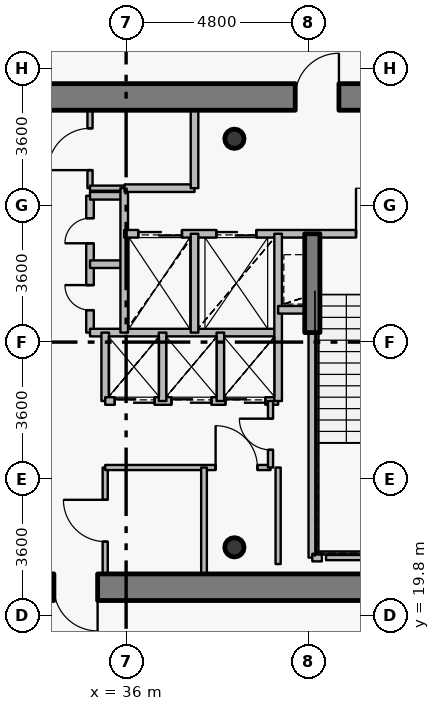
"""IFC4 building model, lengths in metres.
Left out: names, types, materials, properties, quantities, classifications, styles, units other than length and angle.
Written with IfcOpenShell. Run it as: python <this file> out.ifc"""

import sys

from ifc_helpers import new_model, si_unit, direction, frame, frame_2d, origin, origin_2d, place, context, subcontext, project, spatial, rectangle, hollow_circle, extrude, source, transform, mapped, element, fill, save


model = new_model("IFC4")
c1 = context("Model", 3, precision=1e-05, world=origin(), true_north=direction((0.0, 1.0)))
c2 = subcontext(c1, "Body", "Model", "MODEL_VIEW")
j1 = project(units=[si_unit("LENGTHUNIT", "METRE"), si_unit("PLANEANGLEUNIT", "RADIAN")], contexts=[c1])
p1 = place(None, origin())
s1 = spatial("IfcSite", under=j1, at=p1, CompositionType="ELEMENT")
p2 = place(p1, origin())
s2 = spatial("IfcBuilding", under=s1, at=p2, CompositionType="ELEMENT")
p3 = place(p2, frame((0.0, 0.0, 346.8)))
s3 = spatial("IfcBuildingStorey", under=s2, at=p3, CompositionType="ELEMENT", Elevation=346.8)
for number, where, z_axis, x_axis in (
    (1, (38.85, 21.6, 0.0), (0.0, 0.0, 1.0), (1.0, 0.0, 0.0)),
    (2, (38.85, 32.35, 0.0), (0.0, 0.0, 1.0), (1.0, 0.0, 0.0)),
):
    element("IfcColumn", number, at=place(p3, frame(where, z_axis=z_axis, x_axis=x_axis)), inside=s3, PredefinedType="COLUMN", context=c2, shape_type="SweptSolid", body=[
        extrude(hollow_circle(Radius=0.254, WallThickness=0.02, at=origin_2d()), origin(), (0.0, 0.0, 1.0), 4.2),
    ])
p4 = place(p3, frame((27.6, 33.45, 0.0), z_axis=(0.0, 0.0, 1.0), x_axis=(1.0, 0.0, 0.0)))
e3 = element("IfcWall", 3, at=p4, inside=s3, PredefinedType="SHEAR", context=c2, shape_type="SweptSolid", body=[
    extrude(rectangle(XDim=16.8, YDim=0.7, at=frame_2d((8.4, 0.0))), origin(), (0.0, 0.0, 1.0), 3.45),
])
p5 = place(p4, frame((12.85, 0.0, 0.0)))
e4 = element("IfcOpeningElement", 4, at=p5, cuts=e3, PredefinedType="OPENING", context=c2, shape_type="SweptSolid", body=[
    extrude(rectangle(XDim=1.15, YDim=2.15, at=origin_2d()), frame((0.575, 0.36, 1.075), z_axis=(0.0, -1.0, 0.0), x_axis=(1.0, 0.0, 0.0)), (0.0, 0.0, 1.0), 0.72),
])
p6 = place(p3, frame((44.4, 20.55, 0.0), z_axis=(0.0, 0.0, 1.0), x_axis=(-1.0, 0.0, 0.0)))
e5 = element("IfcWall", 5, at=p6, inside=s3, PredefinedType="SHEAR", context=c2, shape_type="SweptSolid", body=[
    extrude(rectangle(XDim=16.8, YDim=0.7, at=frame_2d((8.4, 0.0))), origin(), (0.0, 0.0, 1.0), 3.45),
])
p7 = place(p6, frame((13.0, 0.0, 0.0)))
e6 = element("IfcOpeningElement", 6, at=p7, cuts=e5, PredefinedType="OPENING", context=c2, shape_type="SweptSolid", body=[
    extrude(rectangle(XDim=1.15, YDim=2.15, at=origin_2d()), frame((0.575, 0.36, 1.075), z_axis=(0.0, -1.0, 0.0), x_axis=(1.0, 0.0, 0.0)), (0.0, 0.0, 1.0), 0.72),
])
p8 = place(p6, frame((9.15, 0.0, 0.0)))
e7 = element("IfcOpeningElement", 7, at=p8, cuts=e5, PredefinedType="OPENING", context=c2, shape_type="SweptSolid", body=[
    extrude(rectangle(XDim=1.15, YDim=2.15, at=origin_2d()), frame((0.575, 0.36, 1.075), z_axis=(0.0, -1.0, 0.0), x_axis=(1.0, 0.0, 0.0)), (0.0, 0.0, 1.0), 0.72),
])
p9 = place(p3, frame((40.9, 27.25, 0.0), z_axis=(0.0, 0.0, 1.0), x_axis=(0.0, 1.0, 0.0)))
e8 = element("IfcWall", 8, at=p9, inside=s3, PredefinedType="SHEAR", context=c2, shape_type="SweptSolid", body=[
    extrude(rectangle(XDim=2.6, YDim=0.4, at=frame_2d((1.3, 0.0))), origin(), (0.0, 0.0, 1.0), 3.5),
])
p10 = place(p3, frame((35.05, 27.25, 0.0), z_axis=(0.0, 0.0, 1.0), x_axis=(0.0, 1.0, 0.0)))
e9 = element("IfcWall", 9, at=p10, inside=s3, PredefinedType="PARTITIONING", context=c2, shape_type="SweptSolid", body=[
    extrude(rectangle(XDim=3.6, YDim=0.2, at=frame_2d((1.8, 0.0))), origin(), (0.0, 0.0, 1.0), 3.9),
])
p11 = place(p10, frame((0.59, 0.0, 0.0)))
e10 = element("IfcOpeningElement", 10, at=p11, cuts=e9, PredefinedType="OPENING", context=c2, shape_type="SweptSolid", body=[
    extrude(rectangle(XDim=0.66, YDim=2.05, at=origin_2d()), frame((0.33, 0.11, 1.025), z_axis=(0.0, -1.0, 0.0), x_axis=(1.0, 0.0, 0.0)), (0.0, 0.0, 1.0), 0.22),
])
p12 = place(p10, frame((2.35, 0.0, 0.0)))
e11 = element("IfcOpeningElement", 11, at=p12, cuts=e9, PredefinedType="OPENING", context=c2, shape_type="SweptSolid", body=[
    extrude(rectangle(XDim=0.66, YDim=2.05, at=origin_2d()), frame((0.33, 0.11, 1.025), z_axis=(0.0, -1.0, 0.0), x_axis=(1.0, 0.0, 0.0)), (0.0, 0.0, 1.0), 0.22),
])
p13 = place(p3, frame((35.05, 27.25, 0.0), z_axis=(0.0, 0.0, 1.0), x_axis=(1.0, 0.0, 0.0)))
e12 = element("IfcWall", 12, at=p13, inside=s3, PredefinedType="PARTITIONING", context=c2, shape_type="SweptSolid", body=[
    extrude(rectangle(XDim=4.95, YDim=0.2, at=frame_2d((2.475, 0.0))), origin(), (0.0, 0.0, 1.0), 3.485),
])
for number, where, z_axis, x_axis in (
    (13, (35.05, 29.05, 0.0), (0.0, 0.0, 1.0), (1.0, 0.0, 0.0)),
    (14, (35.05, 30.85, 0.0), (0.0, 0.0, 1.0), (1.0, 0.0, 0.0)),
):
    element("IfcWall", number, at=place(p3, frame(where, z_axis=z_axis, x_axis=x_axis)), inside=s3, PredefinedType="PARTITIONING", context=c2, shape_type="SweptSolid", body=[
        extrude(rectangle(XDim=0.9, YDim=0.2, at=frame_2d((0.45, 0.0))), origin(), (0.0, 0.0, 1.0), 3.9),
    ])
p14 = place(p3, frame((35.05, 31.05, 0.0), z_axis=(0.0, 0.0, 1.0), x_axis=(0.0, 1.0, 0.0)))
e15 = element("IfcWall", 15, at=p14, inside=s3, PredefinedType="PARTITIONING", context=c2, shape_type="SweptSolid", body=[
    extrude(rectangle(XDim=2.05, YDim=0.135, at=frame_2d((1.025, 0.0))), origin(), (0.0, 0.0, 1.0), 3.485),
])
p15 = place(p14, frame((0.475, 0.0, 0.0)))
e16 = element("IfcOpeningElement", 16, at=p15, cuts=e15, PredefinedType="OPENING", context=c2, shape_type="SweptSolid", body=[
    extrude(rectangle(XDim=1.1, YDim=2.15, at=origin_2d()), frame((0.55, 0.078, 1.075), z_axis=(0.0, -1.0, 0.0), x_axis=(1.0, 0.0, 0.0)), (0.0, 0.0, 1.0), 0.155),
])
p16 = place(p3, frame((35.05, 31.05, 0.0), z_axis=(0.0, 0.0, 1.0), x_axis=(1.0, 0.0, 0.0)))
e17 = element("IfcWall", 17, at=p16, inside=s3, PredefinedType="PARTITIONING", context=c2, shape_type="SweptSolid", body=[
    extrude(rectangle(XDim=0.9, YDim=0.135, at=frame_2d((0.45, 0.0))), origin(), (0.0, 0.0, 1.0), 3.9),
])
p17 = place(p3, frame((35.45, 20.9, 0.0), z_axis=(0.0, 0.0, 1.0), x_axis=(0.0, 1.0, 0.0)))
e18 = element("IfcWall", 18, at=p17, inside=s3, PredefinedType="PARTITIONING", context=c2, shape_type="SweptSolid", body=[
    extrude(rectangle(XDim=2.8, YDim=0.135, at=frame_2d((1.4, 0.0))), origin(), (0.0, 0.0, 1.0), 3.485),
])
p18 = place(p17, frame((0.85, 0.0, 0.0)))
e19 = element("IfcOpeningElement", 19, at=p18, cuts=e18, PredefinedType="OPENING", context=c2, shape_type="SweptSolid", body=[
    extrude(rectangle(XDim=1.1, YDim=2.15, at=origin_2d()), frame((0.55, 0.078, 1.075), z_axis=(0.0, -1.0, 0.0), x_axis=(1.0, 0.0, 0.0)), (0.0, 0.0, 1.0), 0.155),
])
p19 = place(p3, frame((35.45, 23.7, 0.0), z_axis=(0.0, 0.0, 1.0), x_axis=(1.0, 0.0, 0.0)))
e20 = element("IfcWall", 20, at=p19, inside=s3, PredefinedType="PARTITIONING", context=c2, shape_type="SweptSolid", body=[
    extrude(rectangle(XDim=4.35, YDim=0.135, at=frame_2d((2.175, 0.0))), origin(), (0.0, 0.0, 1.0), 3.485),
])
p20 = place(p19, frame((2.905, 0.0, 0.0)))
e21 = element("IfcOpeningElement", 21, at=p20, cuts=e20, PredefinedType="OPENING", context=c2, shape_type="SweptSolid", body=[
    extrude(rectangle(XDim=1.1, YDim=2.15, at=origin_2d()), frame((0.55, 0.078, 1.075), z_axis=(0.0, -1.0, 0.0), x_axis=(1.0, 0.0, 0.0)), (0.0, 0.0, 1.0), 0.155),
])
p21 = place(p3, frame((35.45, 25.45, 0.0), z_axis=(0.0, 0.0, 1.0), x_axis=(0.0, 1.0, 0.0)))
e22 = element("IfcWall", 22, at=p21, inside=s3, PredefinedType="PARTITIONING", context=c2, shape_type="SweptSolid", body=[
    extrude(rectangle(XDim=1.8, YDim=0.2, at=frame_2d((0.9, 0.0))), origin(), (0.0, 0.0, 1.0), 3.9),
])
p22 = place(p3, frame((35.45, 25.45, 0.0), z_axis=(0.0, 0.0, 1.0), x_axis=(1.0, 0.0, 0.0)))
e23 = element("IfcWall", 23, at=p22, inside=s3, PredefinedType="PARTITIONING", context=c2, shape_type="SweptSolid", body=[
    extrude(rectangle(XDim=4.55, YDim=0.2, at=frame_2d((2.275, 0.0))), origin(), (0.0, 0.0, 1.0), 3.485),
])
p23 = place(p22, frame((0.25, 0.0, 0.0)))
e24 = element("IfcOpeningElement", 24, at=p23, cuts=e23, PredefinedType="OPENING", context=c2, shape_type="SweptSolid", body=[
    extrude(rectangle(XDim=1.05, YDim=2.15, at=origin_2d()), frame((0.525, 0.11, 1.075), z_axis=(0.0, -1.0, 0.0), x_axis=(1.0, 0.0, 0.0)), (0.0, 0.0, 1.0), 0.22),
])
p24 = place(p22, frame((1.745, 0.0, 0.0)))
e25 = element("IfcOpeningElement", 25, at=p24, cuts=e23, PredefinedType="OPENING", context=c2, shape_type="SweptSolid", body=[
    extrude(rectangle(XDim=1.05, YDim=2.15, at=origin_2d()), frame((0.525, 0.11, 1.075), z_axis=(0.0, -1.0, 0.0), x_axis=(1.0, 0.0, 0.0)), (0.0, 0.0, 1.0), 0.22),
])
p25 = place(p22, frame((3.165, 0.0, 0.0)))
e26 = element("IfcOpeningElement", 26, at=p25, cuts=e23, PredefinedType="OPENING", context=c2, shape_type="SweptSolid", body=[
    extrude(rectangle(XDim=1.05, YDim=2.15, at=origin_2d()), frame((0.525, 0.11, 1.075), z_axis=(0.0, -1.0, 0.0), x_axis=(1.0, 0.0, 0.0)), (0.0, 0.0, 1.0), 0.22),
])
p26 = place(p3, frame((35.95, 27.25, 0.0), z_axis=(0.0, 0.0, 1.0), x_axis=(0.0, 1.0, 0.0)))
e27 = element("IfcWall", 27, at=p26, inside=s3, PredefinedType="PARTITIONING", context=c2, shape_type="SweptSolid", body=[
    extrude(rectangle(XDim=3.8, YDim=0.2, at=frame_2d((1.9, 0.0))), origin(), (0.0, 0.0, 1.0), 3.9),
])
p27 = place(p3, frame((35.95, 29.85, 0.0), z_axis=(0.0, 0.0, 1.0), x_axis=(1.0, 0.0, 0.0)))
e28 = element("IfcWall", 28, at=p27, inside=s3, PredefinedType="PARTITIONING", context=c2, shape_type="SweptSolid", body=[
    extrude(rectangle(XDim=8.49, YDim=0.2, at=frame_2d((4.245, 0.0))), origin(), (0.0, 0.0, 1.0), 3.485),
])
p28 = place(p27, frame((6.1, 0.0, 0.0)))
e29 = element("IfcOpeningElement", 29, at=p28, cuts=e28, PredefinedType="OPENING", context=c2, shape_type="SweptSolid", body=[
    extrude(rectangle(XDim=1.2, YDim=2.15, at=origin_2d()), frame((0.6, 0.11, 1.075), z_axis=(0.0, -1.0, 0.0), x_axis=(1.0, 0.0, 0.0)), (0.0, 0.0, 1.0), 0.22),
])
p29 = place(p27, frame((0.37, 0.0, 0.0)))
e30 = element("IfcOpeningElement", 30, at=p29, cuts=e28, PredefinedType="OPENING", context=c2, shape_type="SweptSolid", body=[
    extrude(rectangle(XDim=1.15, YDim=2.15, at=origin_2d()), frame((0.575, 0.11, 1.075), z_axis=(0.0, -1.0, 0.0), x_axis=(1.0, 0.0, 0.0)), (0.0, 0.0, 1.0), 0.22),
])
p30 = place(p27, frame((2.425, 0.0, 0.0)))
e31 = element("IfcOpeningElement", 31, at=p30, cuts=e28, PredefinedType="OPENING", context=c2, shape_type="SweptSolid", body=[
    extrude(rectangle(XDim=1.05, YDim=2.15, at=origin_2d()), frame((0.525, 0.11, 1.075), z_axis=(0.0, -1.0, 0.0), x_axis=(1.0, 0.0, 0.0)), (0.0, 0.0, 1.0), 0.22),
])
p31 = place(p3, frame((35.96, 31.05, 0.0), z_axis=(0.0, 0.0, 1.0), x_axis=(1.0, 0.0, 0.0)))
e32 = element("IfcWall", 32, at=p31, inside=s3, PredefinedType="PARTITIONING", context=c2, shape_type="SweptSolid", body=[
    extrude(rectangle(XDim=1.84, YDim=0.2, at=frame_2d((0.92, 0.0))), origin(), (0.0, 0.0, 1.0), 3.9),
])
p32 = place(p3, frame((36.96, 25.45, 0.0), z_axis=(0.0, 0.0, 1.0), x_axis=(0.0, 1.0, 0.0)))
e33 = element("IfcWall", 33, at=p32, inside=s3, PredefinedType="PARTITIONING", context=c2, shape_type="SweptSolid", body=[
    extrude(rectangle(XDim=1.8, YDim=0.2, at=frame_2d((0.9, 0.0))), origin(), (0.0, 0.0, 1.0), 3.9),
])
p33 = place(p3, frame((37.8, 27.25, 0.0), z_axis=(0.0, 0.0, 1.0), x_axis=(0.0, 1.0, 0.0)))
e34 = element("IfcWall", 34, at=p33, inside=s3, PredefinedType="PARTITIONING", context=c2, shape_type="SweptSolid", body=[
    extrude(rectangle(XDim=2.6, YDim=0.2, at=frame_2d((1.3, 0.0))), origin(), (0.0, 0.0, 1.0), 3.9),
])
p34 = place(p3, frame((37.8, 31.05, 0.0), z_axis=(0.0, 0.0, 1.0), x_axis=(0.0, 1.0, 0.0)))
e35 = element("IfcWall", 35, at=p34, inside=s3, PredefinedType="PARTITIONING", context=c2, shape_type="SweptSolid", body=[
    extrude(rectangle(XDim=2.05, YDim=0.2, at=frame_2d((1.025, 0.0))), origin(), (0.0, 0.0, 1.0), 3.485),
])
p35 = place(p3, frame((38.05, 20.38, 0.0), z_axis=(0.0, 0.0, 1.0), x_axis=(0.0, 1.0, 0.0)))
e36 = element("IfcWall", 36, at=p35, inside=s3, PredefinedType="PARTITIONING", context=c2, shape_type="SweptSolid", body=[
    extrude(rectangle(XDim=3.32, YDim=0.15, at=frame_2d((1.66, 0.0))), origin(), (0.0, 0.0, 1.0), 3.435),
])
p36 = place(p3, frame((38.48, 25.45, 0.0), z_axis=(0.0, 0.0, 1.0), x_axis=(0.0, 1.0, 0.0)))
e37 = element("IfcWall", 37, at=p36, inside=s3, PredefinedType="PARTITIONING", context=c2, shape_type="SweptSolid", body=[
    extrude(rectangle(XDim=1.8, YDim=0.2, at=frame_2d((0.9, 0.0))), origin(), (0.0, 0.0, 1.0), 3.9),
])
p37 = place(p3, frame((39.8, 23.7, 0.0), z_axis=(0.0, 0.0, 1.0), x_axis=(0.0, 1.0, 0.0)))
e38 = element("IfcWall", 38, at=p37, inside=s3, PredefinedType="PARTITIONING", context=c2, shape_type="SweptSolid", body=[
    extrude(rectangle(XDim=1.75, YDim=0.135, at=frame_2d((0.875, 0.0))), origin(), (0.0, 0.0, 1.0), 3.9),
])
p38 = place(p37, frame((0.465, 0.0, 0.0)))
e39 = element("IfcOpeningElement", 39, at=p38, cuts=e38, PredefinedType="OPENING", context=c2, shape_type="SweptSolid", body=[
    extrude(rectangle(XDim=0.82, YDim=2.1, at=origin_2d()), frame((0.41, 0.078, 1.05), z_axis=(0.0, -1.0, 0.0), x_axis=(1.0, 0.0, 0.0)), (0.0, 0.0, 1.0), 0.155),
])
p39 = place(p3, frame((40.0, 25.45, 0.0), z_axis=(0.0, 0.0, 1.0), x_axis=(0.0, 1.0, 0.0)))
e40 = element("IfcWall", 40, at=p39, inside=s3, PredefinedType="PARTITIONING", context=c2, shape_type="SweptSolid", body=[
    extrude(rectangle(XDim=4.4, YDim=0.2, at=frame_2d((2.2, 0.0))), origin(), (0.0, 0.0, 1.0), 3.9),
])
p40 = place(p3, frame((40.0, 27.85, 0.0), z_axis=(0.0, 0.0, 1.0), x_axis=(1.0, 0.0, 0.0)))
e41 = element("IfcWall", 41, at=p40, inside=s3, PredefinedType="PARTITIONING", context=c2, shape_type="SweptSolid", body=[
    extrude(rectangle(XDim=0.9, YDim=0.2, at=frame_2d((0.45, 0.0))), origin(), (0.0, 0.0, 1.0), 3.9),
])
p41 = place(p3, frame((40.9, 21.33, 0.0), z_axis=(0.0, 0.0, 1.0), x_axis=(0.0, 1.0, 0.0)))
e42 = element("IfcWall", 42, at=p41, inside=s3, PredefinedType="PARTITIONING", context=c2, shape_type="SweptSolid", body=[
    extrude(rectangle(XDim=5.91, YDim=0.2, at=frame_2d((2.955, 0.0))), origin(), (0.0, 0.0, 1.0), 3.435),
])
p42 = place(p3, frame((40.9, 21.33, 0.0), z_axis=(0.0, 0.0, 1.0), x_axis=(1.0, 0.0, 0.0)))
e43 = element("IfcWall", 43, at=p42, inside=s3, PredefinedType="PARTITIONING", context=c2, shape_type="SweptSolid", body=[
    extrude(rectangle(XDim=0.25, YDim=0.2, at=frame_2d((0.125, 0.0))), origin(), (0.0, 0.0, 1.0), 3.435),
])
p43 = place(p3, frame((44.24, 21.33, 0.0), z_axis=(0.0, 0.0, 1.0), x_axis=(-1.0, 0.0, 0.0)))
e44 = element("IfcWall", 44, at=p43, inside=s3, PredefinedType="PARTITIONING", context=c2, shape_type="SweptSolid", body=[
    extrude(rectangle(XDim=2.98, YDim=0.135, at=frame_2d((1.49, 0.0))), origin(), (0.0, 0.0, 1.0), 3.435),
])
p44 = place(p3, frame((40.0, 23.7, 0.0), z_axis=(0.0, 0.0, 1.0), x_axis=(0.0, -1.0, 0.0)))
e45 = element("IfcWall", 45, at=p44, inside=s3, PredefinedType="PARTITIONING", context=c2, shape_type="SweptSolid", body=[
    extrude(rectangle(XDim=2.54, YDim=0.135, at=frame_2d((1.27, 0.0))), origin(), (0.0, 0.0, 1.0), 3.435),
])
m1 = source(origin(), c2, "Body", "SweptSolid", [
    extrude(rectangle(XDim=1.15, YDim=2.15, at=origin_2d()), frame((0.575, 0.025, 1.075), z_axis=(0.0, -1.0, 0.0), x_axis=(1.0, 0.0, 0.0)), (0.0, 0.0, 1.0), 0.05),
])
p45 = place(p5, origin())
e46 = element("IfcDoor", 46, at=p45, inside=s3, OperationType="SINGLE_SWING_RIGHT", PredefinedType="DOOR", context=c2, shape_type="MappedRepresentation", body=[
    mapped(m1, transform((0.0, 0.0, 0.0), x_axis=(1.0, 0.0, 0.0), y_axis=(0.0, 1.0, 0.0), z_axis=(0.0, 0.0, 1.0), scale=1.0)),
])
fill(e4, e46)
p46 = place(p8, origin())
e47 = element("IfcDoor", 47, at=p46, inside=s3, OperationType="SINGLE_SWING_LEFT", PredefinedType="DOOR", context=c2, shape_type="MappedRepresentation", body=[
    mapped(m1, transform((0.0, 0.0, 0.0), x_axis=(1.0, 0.0, 0.0), y_axis=(0.0, 1.0, 0.0), z_axis=(0.0, 0.0, 1.0), scale=1.0)),
])
fill(e7, e47)
m2 = source(origin(), c2, "Body", "SweptSolid", [
    extrude(rectangle(XDim=1.2, YDim=2.15, at=origin_2d()), frame((0.6, 0.025, 1.075), z_axis=(0.0, -1.0, 0.0), x_axis=(1.0, 0.0, 0.0)), (0.0, 0.0, 1.0), 0.05),
])
p47 = place(p28, origin())
e48 = element("IfcDoor", 48, at=p47, inside=s3, OperationType="SINGLE_SWING_LEFT", PredefinedType="DOOR", context=c2, shape_type="MappedRepresentation", body=[
    mapped(m2, transform((0.0, 0.0, 0.0), x_axis=(1.0, 0.0, 0.0), y_axis=(0.0, 1.0, 0.0), z_axis=(0.0, 0.0, 1.0), scale=1.0)),
])
fill(e29, e48)
m3 = source(origin(), c2, "Body", "SweptSolid", [
    extrude(rectangle(XDim=1.15, YDim=2.15, at=origin_2d()), frame((0.575, 0.025, 1.075), z_axis=(0.0, -1.0, 0.0), x_axis=(1.0, 0.0, 0.0)), (0.0, 0.0, 1.0), 0.05),
])
p48 = place(p29, origin())
e49 = element("IfcDoor", 49, at=p48, inside=s3, OperationType="DOUBLE_DOOR_SLIDING", PredefinedType="USERDEFINED", context=c2, shape_type="MappedRepresentation", body=[
    mapped(m3, transform((0.0, 0.0, 0.0), x_axis=(1.0, 0.0, 0.0), y_axis=(0.0, 1.0, 0.0), z_axis=(0.0, 0.0, 1.0), scale=1.0)),
])
fill(e30, e49)
m4 = source(origin(), c2, "Body", "SweptSolid", [
    extrude(rectangle(XDim=1.05, YDim=2.15, at=origin_2d()), frame((0.525, 0.025, 1.075), z_axis=(0.0, -1.0, 0.0), x_axis=(1.0, 0.0, 0.0)), (0.0, 0.0, 1.0), 0.05),
])
p49 = place(p30, origin())
e50 = element("IfcDoor", 50, at=p49, inside=s3, OperationType="DOUBLE_DOOR_SLIDING", PredefinedType="USERDEFINED", context=c2, shape_type="MappedRepresentation", body=[
    mapped(m4, transform((0.0, 0.0, 0.0), x_axis=(1.0, 0.0, 0.0), y_axis=(0.0, 1.0, 0.0), z_axis=(0.0, 0.0, 1.0), scale=1.0)),
])
fill(e31, e50)
p50 = place(p23, origin())
e51 = element("IfcDoor", 51, at=p50, inside=s3, OperationType="DOUBLE_DOOR_SLIDING", PredefinedType="USERDEFINED", context=c2, shape_type="MappedRepresentation", body=[
    mapped(m4, transform((0.0, 0.0, 0.0), x_axis=(1.0, 0.0, 0.0), y_axis=(0.0, 1.0, 0.0), z_axis=(0.0, 0.0, 1.0), scale=1.0)),
])
fill(e24, e51)
p51 = place(p24, origin())
e52 = element("IfcDoor", 52, at=p51, inside=s3, OperationType="DOUBLE_DOOR_SLIDING", PredefinedType="USERDEFINED", context=c2, shape_type="MappedRepresentation", body=[
    mapped(m4, transform((0.0, 0.0, 0.0), x_axis=(1.0, 0.0, 0.0), y_axis=(0.0, 1.0, 0.0), z_axis=(0.0, 0.0, 1.0), scale=1.0)),
])
fill(e25, e52)
p52 = place(p25, origin())
e53 = element("IfcDoor", 53, at=p52, inside=s3, OperationType="DOUBLE_DOOR_SLIDING", PredefinedType="USERDEFINED", context=c2, shape_type="MappedRepresentation", body=[
    mapped(m4, transform((0.0, 0.0, 0.0), x_axis=(1.0, 0.0, 0.0), y_axis=(0.0, 1.0, 0.0), z_axis=(0.0, 0.0, 1.0), scale=1.0)),
])
fill(e26, e53)
m5 = source(origin(), c2, "Body", "SweptSolid", [
    extrude(rectangle(XDim=0.66, YDim=2.05, at=origin_2d()), frame((0.33, 0.025, 1.025), z_axis=(0.0, -1.0, 0.0), x_axis=(1.0, 0.0, 0.0)), (0.0, 0.0, 1.0), 0.05),
])
p53 = place(p11, origin())
e54 = element("IfcDoor", 54, at=p53, inside=s3, OperationType="SINGLE_SWING_RIGHT", PredefinedType="USERDEFINED", context=c2, shape_type="MappedRepresentation", body=[
    mapped(m5, transform((0.0, 0.0, 0.0), x_axis=(1.0, 0.0, 0.0), y_axis=(0.0, 1.0, 0.0), z_axis=(0.0, 0.0, 1.0), scale=1.0)),
])
fill(e10, e54)
p54 = place(p12, origin())
e55 = element("IfcDoor", 55, at=p54, inside=s3, OperationType="SINGLE_SWING_LEFT", PredefinedType="USERDEFINED", context=c2, shape_type="MappedRepresentation", body=[
    mapped(m5, transform((0.0, 0.0, 0.0), x_axis=(1.0, 0.0, 0.0), y_axis=(0.0, 1.0, 0.0), z_axis=(0.0, 0.0, 1.0), scale=1.0)),
])
fill(e11, e55)
m6 = source(origin(), c2, "Body", "SweptSolid", [
    extrude(rectangle(XDim=1.1, YDim=2.15, at=origin_2d()), frame((0.55, 0.025, 1.075), z_axis=(0.0, -1.0, 0.0), x_axis=(1.0, 0.0, 0.0)), (0.0, 0.0, 1.0), 0.05),
])
p55 = place(p18, origin())
e56 = element("IfcDoor", 56, at=p55, inside=s3, OperationType="SINGLE_SWING_RIGHT", PredefinedType="DOOR", context=c2, shape_type="MappedRepresentation", body=[
    mapped(m6, transform((0.0, 0.0, 0.0), x_axis=(1.0, 0.0, 0.0), y_axis=(0.0, 1.0, 0.0), z_axis=(0.0, 0.0, 1.0), scale=1.0)),
])
fill(e19, e56)
p56 = place(p20, origin())
e57 = element("IfcDoor", 57, at=p56, inside=s3, OperationType="SINGLE_SWING_LEFT", PredefinedType="DOOR", context=c2, shape_type="MappedRepresentation", body=[
    mapped(m6, transform((0.0, 0.0, 0.0), x_axis=(1.0, 0.0, 0.0), y_axis=(0.0, 1.0, 0.0), z_axis=(0.0, 0.0, 1.0), scale=1.0)),
])
fill(e21, e57)
p57 = place(p15, origin())
e58 = element("IfcDoor", 58, at=p57, inside=s3, OperationType="SINGLE_SWING_LEFT", PredefinedType="DOOR", context=c2, shape_type="MappedRepresentation", body=[
    mapped(m6, transform((0.0, 0.0, 0.0), x_axis=(1.0, 0.0, 0.0), y_axis=(0.0, 1.0, 0.0), z_axis=(0.0, 0.0, 1.0), scale=1.0)),
])
fill(e16, e58)
m7 = source(origin(), c2, "Body", "SweptSolid", [
    extrude(rectangle(XDim=0.82, YDim=2.1, at=origin_2d()), frame((0.41, 0.025, 1.05), z_axis=(0.0, -1.0, 0.0), x_axis=(1.0, 0.0, 0.0)), (0.0, 0.0, 1.0), 0.05),
])
p58 = place(p38, origin())
e59 = element("IfcDoor", 59, at=p58, inside=s3, OperationType="SINGLE_SWING_RIGHT", PredefinedType="DOOR", context=c2, shape_type="MappedRepresentation", body=[
    mapped(m7, transform((0.0, 0.0, 0.0), x_axis=(1.0, 0.0, 0.0), y_axis=(0.0, 1.0, 0.0), z_axis=(0.0, 0.0, 1.0), scale=1.0)),
])
fill(e39, e59)
save(model, sys.argv[1])
